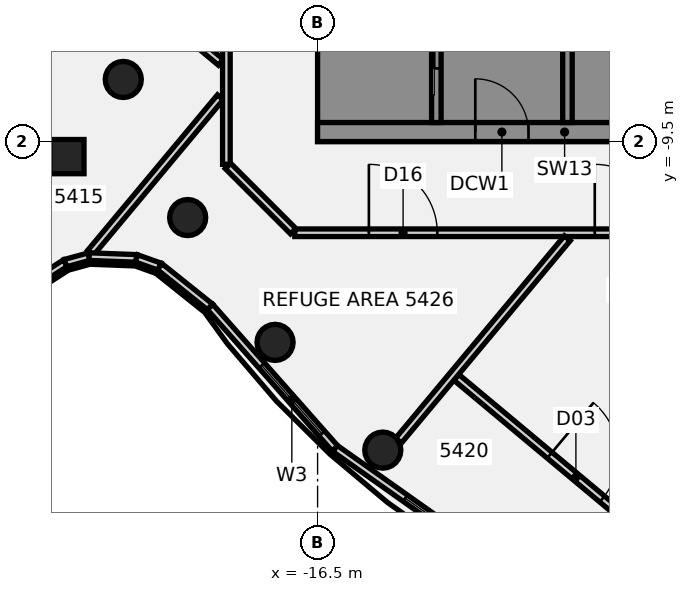
"""IFC4 building model, lengths in metres.
Left out: names, types, materials, properties, quantities, classifications, styles, units other than length and angle.
Written with IfcOpenShell. Run it as: python <this file> out.ifc"""

import sys

from ifc_helpers import new_model, si_unit, direction, frame, frame_2d, origin, origin_2d, place, context, subcontext, project, spatial, polyline, rectangle, circle, outline, extrude, element, fill, save


model = new_model("IFC4")
c1 = context("Model", 3, precision=1e-05, world=origin(), true_north=direction((0.0, 1.0)))
c2 = subcontext(c1, "Body", "Model", "MODEL_VIEW")
j1 = project(units=[si_unit("LENGTHUNIT", "METRE"), si_unit("PLANEANGLEUNIT", "RADIAN")], contexts=[c1])
p1 = place(None, origin())
s1 = spatial("IfcSite", under=j1, at=p1, CompositionType="ELEMENT")
p2 = place(p1, origin())
s2 = spatial("IfcBuilding", under=s1, at=p2, CompositionType="ELEMENT")
p3 = place(p2, frame((0.0, 0.0, 214.9)))
s3 = spatial("IfcBuildingStorey", under=s2, at=p3, CompositionType="ELEMENT", Elevation=214.9)
for number, where, z_axis, x_axis in (
    (1, (-21.613, -7.866, -0.18), (0.0, 0.0, 1.0), (1.0, 0.0, 0.0)),
    (2, (-19.919, -11.5, -0.18), (0.0, 0.0, 1.0), (1.0, 0.0, 0.0)),
    (3, (-17.619, -14.784, -0.18), (0.0, 0.0, 1.0), (1.0, 0.0, 0.0)),
    (4, (-14.784, -17.619, -0.18), (0.0, 0.0, 1.0), (1.0, 0.0, 0.0)),
):
    element("IfcColumn", number, at=place(p3, frame(where, z_axis=z_axis, x_axis=x_axis)), inside=s3, PredefinedType="COLUMN", context=c2, shape_type="SweptSolid", body=[
        extrude(circle(Radius=0.475, at=origin_2d()), origin(), (0.0, 0.0, 1.0), 5.04),
    ])
p4 = place(p3, frame((-23.096, -9.896, -0.174), z_axis=(0.03580550969, -0.00363877131, 0.999352152556), x_axis=(-0.767126989756, 0.640801875223, 0.029818422132)))
e5 = element("IfcColumn", 5, at=p4, inside=s3, PredefinedType="COLUMN", context=c2, shape_type="SweptSolid", body=[
    extrude(rectangle(XDim=0.9, YDim=0.9, at=origin_2d()), origin(), (0.0, 0.0, 1.0), 5.032),
])
p5 = place(p3, frame((-18.858, -10.142, 0.0), z_axis=(0.0, 0.0, 1.0), x_axis=(0.707106781187, -0.707106781187, 0.0)))
e6 = element("IfcWall", 6, at=p5, inside=s3, PredefinedType="PARTITIONING", context=c2, shape_type="SweptSolid", body=[
    extrude(rectangle(XDim=2.426, YDim=0.2, at=frame_2d((1.213, 0.0))), origin(), (0.0, 0.0, 1.0), 4.16),
])
p6 = place(p3, frame((-22.584, -4.461, 0.0), z_axis=(0.0, 0.0, 1.0), x_axis=(0.767782587274, -0.640710463999, 0.0)))
e7 = element("IfcWall", 7, at=p6, inside=s3, PredefinedType="PARTITIONING", context=c2, shape_type="SweptSolid", body=[
    extrude(rectangle(XDim=4.609, YDim=0.2, at=frame_2d((2.305, 0.0))), origin(), (0.0, 0.0, 1.0), 4.16),
])
p7 = place(p3, frame((-12.85, -15.703, 0.0), z_axis=(0.0, 0.0, 1.0), x_axis=(0.767726330183, -0.640777872545, 0.0)))
e8 = element("IfcWall", 8, at=p7, inside=s3, PredefinedType="PARTITIONING", context=c2, shape_type="SweptSolid", body=[
    extrude(rectangle(XDim=10.922, YDim=0.2, at=frame_2d((5.461, 0.0))), origin(), (0.0, 0.0, 1.0), 4.16),
])
p8 = place(p7, frame((3.2, 0.0, 0.0)))
e9 = element("IfcOpeningElement", 9, at=p8, cuts=e8, PredefinedType="OPENING", context=c2, shape_type="SweptSolid", body=[
    extrude(rectangle(XDim=1.8, YDim=2.1, at=frame_2d((0.9, 1.05))), frame((0.0, 0.11, 0.0), z_axis=(0.0, -1.0, 0.0), x_axis=(1.0, 0.0, 0.0)), (0.0, 0.0, 1.0), 0.22),
])
p9 = place(p3, frame((-17.1, -11.9, 0.0), z_axis=(0.0, 0.0, 1.0), x_axis=(1.0, 0.0, 0.0)))
e10 = element("IfcWall", 10, at=p9, inside=s3, PredefinedType="PARTITIONING", context=c2, shape_type="SweptSolid", body=[
    extrude(rectangle(XDim=34.145, YDim=0.2, at=frame_2d((17.073, 0.0))), origin(), (0.0, 0.0, 1.0), 4.16),
])
p10 = place(p9, frame((7.894, 0.0, 0.0)))
e11 = element("IfcOpeningElement", 11, at=p10, cuts=e10, PredefinedType="OPENING", context=c2, shape_type="SweptSolid", body=[
    extrude(rectangle(XDim=1.8, YDim=2.1, at=frame_2d((0.9, 1.05))), frame((0.0, 0.11, 0.0), z_axis=(0.0, -1.0, 0.0), x_axis=(1.0, 0.0, 0.0)), (0.0, 0.0, 1.0), 0.22),
])
p11 = place(p9, frame((1.95, 0.0, 0.0)))
e12 = element("IfcOpeningElement", 12, at=p11, cuts=e10, PredefinedType="OPENING", context=c2, shape_type="SweptSolid", body=[
    extrude(rectangle(XDim=1.8, YDim=2.1, at=frame_2d((0.9, 1.05))), frame((0.0, 0.11, 0.0), z_axis=(0.0, -1.0, 0.0), x_axis=(1.0, 0.0, 0.0)), (0.0, 0.0, 1.0), 0.22),
])
p12 = place(p9, frame((19.523, 0.0, 0.0)))
e13 = element("IfcOpeningElement", 13, at=p12, cuts=e10, PredefinedType="OPENING", context=c2, shape_type="SweptSolid", body=[
    extrude(rectangle(XDim=1.8, YDim=2.1, at=frame_2d((0.9, 1.05))), frame((0.0, 0.11, 0.0), z_axis=(0.0, -1.0, 0.0), x_axis=(1.0, 0.0, 0.0)), (0.0, 0.0, 1.0), 0.22),
])
p13 = place(p3, frame((-22.473, -12.428, 0.0), z_axis=(0.0, 0.0, 1.0), x_axis=(0.640675113455, 0.767812085734, 0.0)))
e14 = element("IfcWall", 14, at=p13, inside=s3, PredefinedType="PARTITIONING", context=c2, shape_type="SweptSolid", body=[
    extrude(rectangle(XDim=5.333, YDim=0.2, at=frame_2d((2.667, 0.0))), origin(), (0.0, 0.0, 1.0), 4.16),
])
p14 = place(p3, frame((-14.371, -17.37, 0.0), z_axis=(0.0, 0.0, 1.0), x_axis=(0.640582551282, 0.76788931168, 0.0)))
e15 = element("IfcWall", 15, at=p14, inside=s3, PredefinedType="PARTITIONING", context=c2, shape_type="SweptSolid", body=[
    extrude(rectangle(XDim=6.935, YDim=0.2, at=frame_2d((3.467, 0.0))), origin(), (0.0, 0.0, 1.0), 4.16),
])
p15 = place(p3, frame((-18.9, -10.1, 0.0), z_axis=(0.0, 0.0, 1.0), x_axis=(0.0, 1.0, 0.0)))
e16 = element("IfcWall", 16, at=p15, inside=s3, PredefinedType="PARTITIONING", context=c2, shape_type="SweptSolid", body=[
    extrude(rectangle(XDim=13.973, YDim=0.2, at=frame_2d((6.986, 0.0))), origin(), (0.0, 0.0, 1.0), 4.16),
])
p16 = place(p15, frame((11.658, 0.0, 0.0)))
e17 = element("IfcOpeningElement", 17, at=p16, cuts=e16, PredefinedType="OPENING", context=c2, shape_type="SweptSolid", body=[
    extrude(rectangle(XDim=1.8, YDim=2.1, at=frame_2d((0.9, 1.05))), frame((0.0, 0.11, 0.0), z_axis=(0.0, -1.0, 0.0), x_axis=(1.0, 0.0, 0.0)), (0.0, 0.0, 1.0), 0.22),
])
p17 = place(p3, frame((-24.287, -13.438, 0.0), z_axis=(0.0, 0.0, 1.0), x_axis=(0.841444816205, 0.540343058881, 0.0)))
e18 = element("IfcWall", 18, at=p17, inside=s3, PredefinedType="SOLIDWALL", context=c2, shape_type="SweptSolid", body=[
    extrude(rectangle(XDim=1.369, YDim=0.2, at=frame_2d((0.685, 0.0))), origin(), (0.0, 0.0, 1.0), 4.86),
])
p18 = place(p3, frame((-23.135, -12.698, 0.0), z_axis=(0.0, 0.0, 1.0), x_axis=(0.964650465648, 0.263532690811, 0.0)))
e19 = element("IfcWall", 19, at=p18, inside=s3, PredefinedType="SOLIDWALL", context=c2, shape_type="SweptSolid", body=[
    extrude(rectangle(XDim=0.647, YDim=0.2, at=frame_2d((0.323, 0.0))), origin(), (0.0, 0.0, 1.0), 4.86),
])
p19 = place(p3, frame((-22.511, -12.528, 0.0), z_axis=(0.0, 0.0, 1.0), x_axis=(0.999291824477, -0.037627776093, 0.0)))
e20 = element("IfcWall", 20, at=p19, inside=s3, PredefinedType="SOLIDWALL", context=c2, shape_type="SweptSolid", body=[
    extrude(rectangle(XDim=1.246, YDim=0.2, at=frame_2d((0.623, 0.0))), origin(), (0.0, 0.0, 1.0), 4.86),
])
p20 = place(p3, frame((-21.266, -12.575, 0.0), z_axis=(0.0, 0.0, 1.0), x_axis=(0.9419797958, -0.335669576077, 0.0)))
e21 = element("IfcWall", 21, at=p20, inside=s3, PredefinedType="SOLIDWALL", context=c2, shape_type="SweptSolid", body=[
    extrude(rectangle(XDim=0.649, YDim=0.2, at=frame_2d((0.325, 0.0))), origin(), (0.0, 0.0, 1.0), 4.86),
])
p21 = place(p3, frame((-20.655, -12.793, 0.0), z_axis=(0.0, 0.0, 1.0), x_axis=(0.781177323264, -0.624309209942, 0.0)))
e22 = element("IfcWall", 22, at=p21, inside=s3, PredefinedType="SOLIDWALL", context=c2, shape_type="SweptSolid", body=[
    extrude(rectangle(XDim=1.698, YDim=0.2, at=frame_2d((0.849, 0.0))), origin(), (0.0, 0.0, 1.0), 4.86),
])
p22 = place(p3, frame((-19.328, -13.853, 0.0), z_axis=(0.0, 0.0, 1.0), x_axis=(0.661797193019, -0.749682916513, 0.0)))
e23 = element("IfcWall", 23, at=p22, inside=s3, PredefinedType="SOLIDWALL", context=c2, shape_type="SweptSolid", body=[
    extrude(rectangle(XDim=4.967, YDim=0.2, at=frame_2d((2.483, 0.0))), origin(), (0.0, 0.0, 1.0), 4.86),
])
p23 = place(p22, frame((2.05, 0.0, 1.4)))
e24 = element("IfcOpeningElement", 24, at=p23, cuts=e23, PredefinedType="OPENING", context=c2, shape_type="SweptSolid", body=[
    extrude(rectangle(XDim=2.4, YDim=2.1, at=frame_2d((1.2, 1.05))), frame((0.0, 0.11, 0.0), z_axis=(0.0, -1.0, 0.0), x_axis=(1.0, 0.0, 0.0)), (0.0, 0.0, 1.0), 0.22),
])
p24 = place(p3, frame((-16.041, -17.576, 0.0), z_axis=(0.0, 0.0, 1.0), x_axis=(0.816353639148, -0.577552366327, 0.0)))
e25 = element("IfcWall", 25, at=p24, inside=s3, PredefinedType="SOLIDWALL", context=c2, shape_type="SweptSolid", body=[
    extrude(rectangle(XDim=5.887, YDim=0.2, at=frame_2d((2.943, 0.0))), origin(), (0.0, 0.0, 1.0), 4.86),
])
p25 = place(p24, frame((2.26, 0.0, 1.4)))
e26 = element("IfcOpeningElement", 26, at=p25, cuts=e25, PredefinedType="OPENING", context=c2, shape_type="SweptSolid", body=[
    extrude(rectangle(XDim=2.4, YDim=2.1, at=frame_2d((1.2, 1.05))), frame((0.0, 0.11, 0.0), z_axis=(0.0, -1.0, 0.0), x_axis=(1.0, 0.0, 0.0)), (0.0, 0.0, 1.0), 0.22),
])
p26 = place(p3, frame((-7.634, -17.608, 0.0), z_axis=(0.0, 0.0, 1.0), x_axis=(-0.330366613527, -0.943852690131, 0.0)))
e27 = element("IfcWall", 27, at=p26, inside=s3, PredefinedType="SOLIDWALL", context=c2, shape_type="SweptSolid", body=[
    extrude(rectangle(XDim=4.702, YDim=0.2, at=frame_2d((2.351, 0.0))), origin(), (0.0, 0.0, 1.0), 4.86),
])
p27 = place(p3, frame((-16.5, -9.25, 0.0), z_axis=(0.0, 0.0, 1.0), x_axis=(1.0, 0.0, 0.0)))
e28 = element("IfcWall", 28, at=p27, inside=s3, PredefinedType="SHEAR", context=c2, shape_type="SweptSolid", body=[
    extrude(rectangle(XDim=13.0, YDim=0.5, at=frame_2d((6.5, 0.0))), origin(), (0.0, 0.0, 1.0), 4.86),
])
p28 = place(p27, frame((4.15, 0.0, 0.0)))
e29 = element("IfcOpeningElement", 29, at=p28, cuts=e28, PredefinedType="OPENING", context=c2, shape_type="SweptSolid", body=[
    extrude(rectangle(XDim=1.4, YDim=2.1, at=frame_2d((0.7, 1.05))), frame((0.0, 0.26, 0.0), z_axis=(0.0, -1.0, 0.0), x_axis=(1.0, 0.0, 0.0)), (0.0, 0.0, 1.0), 0.52),
])
p29 = place(p27, frame((10.125, 0.0, 0.0)))
e30 = element("IfcOpeningElement", 30, at=p29, cuts=e28, PredefinedType="OPENING", context=c2, shape_type="SweptSolid", body=[
    extrude(rectangle(XDim=1.4, YDim=2.1, at=frame_2d((0.7, 1.05))), frame((0.0, 0.26, 0.0), z_axis=(0.0, -1.0, 0.0), x_axis=(1.0, 0.0, 0.0)), (0.0, 0.0, 1.0), 0.52),
])
p30 = place(p3, origin())
e31 = element("IfcWall", 31, at=p30, inside=s3, PredefinedType="SHEAR", context=c2, shape_type="SweptSolid", body=[
    extrude(outline(polyline([(-13.5, -8.125), (-16.0, -8.125), (-16.0, -5.625), (-13.5, -5.625), (-13.5, -5.375), (-16.0, -5.375), (-16.0, 5.375), (-13.5, 5.375), (-13.5, 5.625), (-16.0, 5.625), (-16.0, 8.125), (-13.5, 8.125), (-13.5, 9.0), (-16.0, 9.0), (-16.5, 9.0), (-16.5, -9.0), (-16.0, -9.0), (-13.5, -9.0), (-13.5, -8.125)])), origin(), (0.0, 0.0, 1.0), 4.86),
])
p31 = place(p3, origin())
e32 = element("IfcWall", 32, at=p31, inside=s3, PredefinedType="SHEAR", context=c2, shape_type="SweptSolid", body=[
    extrude(outline(polyline([(-7.5, -8.125), (-9.55, -8.125), (-9.55, -5.625), (-9.8, -5.625), (-9.8, -8.125), (-9.8, -9.0), (-7.5, -9.0), (-7.5, -8.125)])), origin(), (0.0, 0.0, 1.0), 4.86),
])
p32 = place(p3, frame((-13.375, -9.0, 0.0), z_axis=(0.0, 0.0, 1.0), x_axis=(0.0, 1.0, 0.0)))
e33 = element("IfcWall", 33, at=p32, inside=s3, PredefinedType="SHEAR", context=c2, shape_type="SweptSolid", body=[
    extrude(rectangle(XDim=18.0, YDim=0.25, at=frame_2d((9.0, 0.0))), origin(), (0.0, 0.0, 1.0), 4.86),
])
p33 = place(p32, frame((1.425, 0.0, 0.0)))
e34 = element("IfcOpeningElement", 34, at=p33, cuts=e33, PredefinedType="OPENING", context=c2, shape_type="SweptSolid", body=[
    extrude(rectangle(XDim=1.4, YDim=2.1, at=frame_2d((0.7, 1.05))), frame((0.0, 0.135, 0.0), z_axis=(0.0, -1.0, 0.0), x_axis=(1.0, 0.0, 0.0)), (0.0, 0.0, 1.0), 0.27),
])
p34 = place(p32, frame((6.646, 0.0, 0.0)))
e35 = element("IfcOpeningElement", 35, at=p34, cuts=e33, PredefinedType="OPENING", context=c2, shape_type="SweptSolid", body=[
    extrude(rectangle(XDim=1.0, YDim=2.1, at=frame_2d((0.5, 1.05))), frame((0.0, 0.135, 0.0), z_axis=(0.0, -1.0, 0.0), x_axis=(1.0, 0.0, 0.0)), (0.0, 0.0, 1.0), 0.27),
])
p35 = place(p32, frame((12.146, 0.0, 0.0)))
e36 = element("IfcOpeningElement", 36, at=p35, cuts=e33, PredefinedType="OPENING", context=c2, shape_type="SweptSolid", body=[
    extrude(rectangle(XDim=1.0, YDim=2.1, at=frame_2d((0.5, 1.05))), frame((0.0, 0.135, 0.0), z_axis=(0.0, -1.0, 0.0), x_axis=(1.0, 0.0, 0.0)), (0.0, 0.0, 1.0), 0.27),
])
p36 = place(p3, frame((-9.925, -9.0, 0.0), z_axis=(0.0, 0.0, 1.0), x_axis=(0.0, 1.0, 0.0)))
e37 = element("IfcWall", 37, at=p36, inside=s3, PredefinedType="SHEAR", context=c2, shape_type="SweptSolid", body=[
    extrude(rectangle(XDim=18.0, YDim=0.25, at=frame_2d((9.0, 0.0))), origin(), (0.0, 0.0, 1.0), 4.86),
])
p37 = place(p36, frame((4.275, 0.0, 0.0)))
e38 = element("IfcOpeningElement", 38, at=p37, cuts=e37, PredefinedType="OPENING", context=c2, shape_type="SweptSolid", body=[
    extrude(rectangle(XDim=1.2, YDim=2.1, at=frame_2d((0.6, 1.05))), frame((0.0, 0.135, 0.0), z_axis=(0.0, -1.0, 0.0), x_axis=(1.0, 0.0, 0.0)), (0.0, 0.0, 1.0), 0.27),
])
p38 = place(p36, frame((7.025, 0.0, 0.0)))
e39 = element("IfcOpeningElement", 39, at=p38, cuts=e37, PredefinedType="OPENING", context=c2, shape_type="SweptSolid", body=[
    extrude(rectangle(XDim=1.2, YDim=2.1, at=frame_2d((0.6, 1.05))), frame((0.0, 0.135, 0.0), z_axis=(0.0, -1.0, 0.0), x_axis=(1.0, 0.0, 0.0)), (0.0, 0.0, 1.0), 0.27),
])
p39 = place(p36, frame((9.825, 0.0, 0.0)))
e40 = element("IfcOpeningElement", 40, at=p39, cuts=e37, PredefinedType="OPENING", context=c2, shape_type="SweptSolid", body=[
    extrude(rectangle(XDim=1.1, YDim=2.1, at=frame_2d((0.55, 1.05))), frame((0.0, 0.135, 0.0), z_axis=(0.0, -1.0, 0.0), x_axis=(1.0, 0.0, 0.0)), (0.0, 0.0, 1.0), 0.27),
])
p40 = place(p36, frame((12.575, 0.0, 0.0)))
e41 = element("IfcOpeningElement", 41, at=p40, cuts=e37, PredefinedType="OPENING", context=c2, shape_type="SweptSolid", body=[
    extrude(rectangle(XDim=1.1, YDim=2.1, at=frame_2d((0.55, 1.05))), frame((0.0, 0.135, 0.0), z_axis=(0.0, -1.0, 0.0), x_axis=(1.0, 0.0, 0.0)), (0.0, 0.0, 1.0), 0.27),
])
p41 = place(p36, frame((15.325, 0.0, 0.0)))
e42 = element("IfcOpeningElement", 42, at=p41, cuts=e37, PredefinedType="OPENING", context=c2, shape_type="SweptSolid", body=[
    extrude(rectangle(XDim=1.1, YDim=2.1, at=frame_2d((0.55, 1.05))), frame((0.0, 0.135, 0.0), z_axis=(0.0, -1.0, 0.0), x_axis=(1.0, 0.0, 0.0)), (0.0, 0.0, 1.0), 0.27),
])
p42 = place(p8, frame((1.8, 0.0, 0.0), z_axis=(0.0, 0.0, 1.0), x_axis=(-1.0, 0.0, 0.0)))
e43 = element("IfcDoor", 43, at=p42, inside=s3, OperationType="DOUBLE_DOOR_SINGLE_SWING", PredefinedType="DOOR", context=c2, shape_type="SweptSolid", body=[
    extrude(rectangle(XDim=1.8, YDim=2.1, at=frame_2d((0.9, 1.05))), frame((0.0, 0.025, 0.0), z_axis=(0.0, -1.0, 0.0), x_axis=(1.0, 0.0, 0.0)), (0.0, 0.0, 1.0), 0.05),
])
fill(e9, e43)
p43 = place(p10, origin())
e44 = element("IfcDoor", 44, at=p43, inside=s3, OperationType="DOUBLE_DOOR_SINGLE_SWING", PredefinedType="DOOR", context=c2, shape_type="SweptSolid", body=[
    extrude(rectangle(XDim=1.8, YDim=2.1, at=frame_2d((0.9, 1.05))), frame((0.0, 0.025, 0.0), z_axis=(0.0, -1.0, 0.0), x_axis=(1.0, 0.0, 0.0)), (0.0, 0.0, 1.0), 0.05),
])
fill(e11, e44)
p44 = place(p11, frame((1.8, 0.0, 0.0), z_axis=(0.0, 0.0, 1.0), x_axis=(-1.0, 0.0, 0.0)))
e45 = element("IfcDoor", 45, at=p44, inside=s3, OperationType="DOUBLE_DOOR_SINGLE_SWING", PredefinedType="DOOR", context=c2, shape_type="SweptSolid", body=[
    extrude(rectangle(XDim=1.8, YDim=2.1, at=frame_2d((0.9, 1.05))), frame((0.0, 0.025, 0.0), z_axis=(0.0, -1.0, 0.0), x_axis=(1.0, 0.0, 0.0)), (0.0, 0.0, 1.0), 0.05),
])
fill(e12, e45)
p45 = place(p25, origin())
e46 = element("IfcWindow", 46, at=p45, inside=s3, PartitioningType="SINGLE_PANEL", PredefinedType="WINDOW", context=c2, shape_type="SweptSolid", body=[
    extrude(rectangle(XDim=2.4, YDim=2.1, at=frame_2d((1.2, 1.05))), frame((0.0, 0.03, 0.0), z_axis=(0.0, -1.0, 0.0), x_axis=(1.0, 0.0, 0.0)), (0.0, 0.0, 1.0), 0.06),
])
fill(e26, e46)
p46 = place(p23, origin())
e47 = element("IfcWindow", 47, at=p46, inside=s3, PartitioningType="SINGLE_PANEL", PredefinedType="WINDOW", context=c2, shape_type="SweptSolid", body=[
    extrude(rectangle(XDim=2.4, YDim=2.1, at=frame_2d((1.2, 1.05))), frame((0.0, 0.03, 0.0), z_axis=(0.0, -1.0, 0.0), x_axis=(1.0, 0.0, 0.0)), (0.0, 0.0, 1.0), 0.06),
])
fill(e24, e47)
p47 = place(p28, origin())
e48 = element("IfcDoor", 48, at=p47, inside=s3, OperationType="SINGLE_SWING_LEFT", PredefinedType="DOOR", context=c2, shape_type="SweptSolid", body=[
    extrude(rectangle(XDim=1.4, YDim=2.1, at=frame_2d((0.7, 1.05))), frame((0.0, 0.025, 0.0), z_axis=(0.0, -1.0, 0.0), x_axis=(1.0, 0.0, 0.0)), (0.0, 0.0, 1.0), 0.05),
])
fill(e29, e48)
p48 = place(p33, origin())
e49 = element("IfcDoor", 49, at=p48, inside=s3, OperationType="SLIDING_TO_LEFT", PredefinedType="DOOR", context=c2, shape_type="SweptSolid", body=[
    extrude(rectangle(XDim=1.4, YDim=2.1, at=frame_2d((0.7, 1.05))), frame((0.0, 0.025, 0.0), z_axis=(0.0, -1.0, 0.0), x_axis=(1.0, 0.0, 0.0)), (0.0, 0.0, 1.0), 0.05),
])
fill(e34, e49)
save(model, sys.argv[1])
